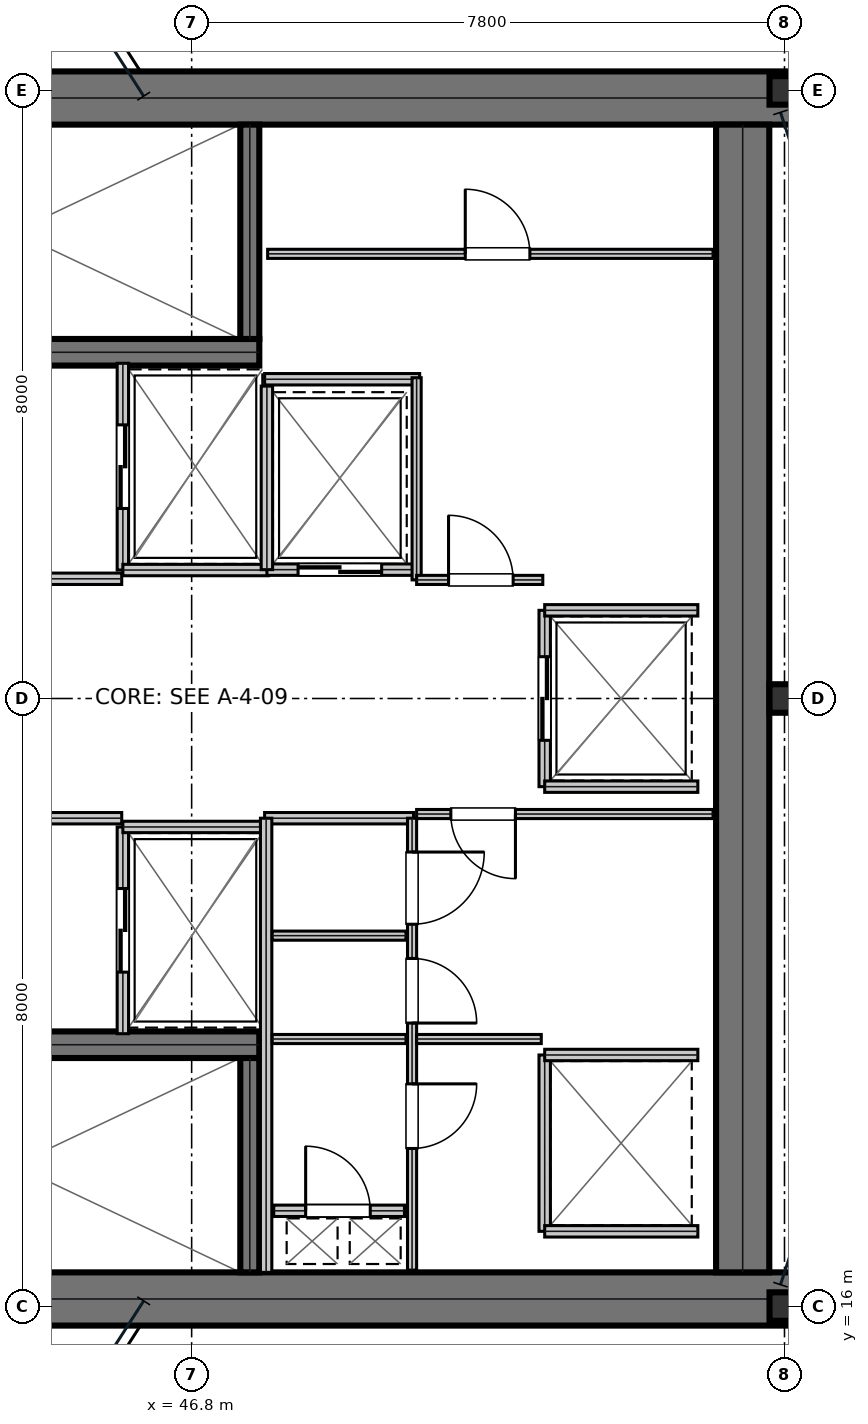
"""IFC4 building model, lengths in metres.
Left out: names, types, materials, properties, quantities, classifications, styles, units other than length and angle.
Written with IfcOpenShell. Run it as: python <this file> out.ifc"""

import sys

from ifc_helpers import new_model, si_unit, direction, frame, frame_2d, origin, origin_2d, place, context, subcontext, project, spatial, rectangle, i_section, extrude, element, fill, save


model = new_model("IFC4")
c1 = context("Model", 3, precision=1e-05, world=origin(), true_north=direction((0.0, 1.0)))
c2 = subcontext(c1, "Body", "Model", "MODEL_VIEW")
j1 = project(units=[si_unit("LENGTHUNIT", "METRE"), si_unit("PLANEANGLEUNIT", "RADIAN")], contexts=[c1])
p1 = place(None, origin())
s1 = spatial("IfcSite", under=j1, at=p1, CompositionType="ELEMENT")
p2 = place(p1, origin())
s2 = spatial("IfcBuilding", under=s1, at=p2, CompositionType="ELEMENT")
p3 = place(p2, frame((0.0, 0.0, 191.85)))
s3 = spatial("IfcBuildingStorey", under=s2, at=p3, CompositionType="ELEMENT", Elevation=191.85)
for number, where, z_axis, x_axis in (
    (1, (38.8, 31.9, 0.0), (0.0, 0.0, 1.0), (1.0, 0.0, 0.0)),
    (2, (38.8, 16.1, 0.0), (0.0, 0.0, 1.0), (1.0, 0.0, 0.0)),
):
    element("IfcWall", number, at=place(p3, frame(where, z_axis=z_axis, x_axis=x_axis)), inside=s3, PredefinedType="SHEAR", context=c2, shape_type="SweptSolid", body=[
        extrude(rectangle(XDim=16.0, YDim=0.7, at=frame_2d((8.0, 0.0))), origin(), (0.0, 0.0, 1.0), 3.79),
    ])
p4 = place(p3, frame((54.05, 16.45, 0.0), z_axis=(0.0, 0.0, 1.0), x_axis=(0.0, 1.0, 0.0)))
e3 = element("IfcWall", 3, at=p4, inside=s3, PredefinedType="SHEAR", context=c2, shape_type="SweptSolid", body=[
    extrude(rectangle(XDim=15.1, YDim=0.7, at=frame_2d((7.55, 0.0))), origin(), (0.0, 0.0, 1.0), 3.79),
])
p5 = place(p3, frame((39.98, 28.555, 0.0), z_axis=(0.0, 0.0, 1.0), x_axis=(1.0, 0.0, 0.0)))
e4 = element("IfcWall", 4, at=p5, inside=s3, PredefinedType="SHEAR", context=c2, shape_type="SweptSolid", body=[
    extrude(rectangle(XDim=7.71, YDim=0.35, at=frame_2d((3.855, 0.0))), origin(), (0.0, 0.0, 1.0), 3.79),
])
p6 = place(p5, frame((0.25, 0.0, 0.0)))
e5 = element("IfcOpeningElement", 5, at=p6, cuts=e4, PredefinedType="OPENING", context=c2, shape_type="SweptSolid", body=[
    extrude(rectangle(XDim=1.1, YDim=2.15, at=frame_2d((0.55, 1.075))), frame((0.0, 0.185, 0.0), z_axis=(0.0, -1.0, 0.0), x_axis=(1.0, 0.0, 0.0)), (0.0, 0.0, 1.0), 0.37),
])
p7 = place(p3, frame((39.98, 19.445, 0.0), z_axis=(0.0, 0.0, 1.0), x_axis=(1.0, 0.0, 0.0)))
e6 = element("IfcWall", 6, at=p7, inside=s3, PredefinedType="SHEAR", context=c2, shape_type="SweptSolid", body=[
    extrude(rectangle(XDim=7.71, YDim=0.35, at=frame_2d((3.855, 0.0))), origin(), (0.0, 0.0, 1.0), 3.79),
])
p8 = place(p7, frame((0.25, 0.0, 0.0)))
e7 = element("IfcOpeningElement", 7, at=p8, cuts=e6, PredefinedType="OPENING", context=c2, shape_type="SweptSolid", body=[
    extrude(rectangle(XDim=1.1, YDim=2.15, at=frame_2d((0.55, 1.075))), frame((0.0, 0.185, 0.0), z_axis=(0.0, -1.0, 0.0), x_axis=(1.0, 0.0, 0.0)), (0.0, 0.0, 1.0), 0.37),
])
for number, where, z_axis, x_axis in (
    (8, (47.565, 28.73, 0.0), (0.0, 0.0, 1.0), (0.0, 1.0, 0.0)),
    (9, (47.565, 16.45, 0.0), (0.0, 0.0, 1.0), (0.0, 1.0, 0.0)),
):
    element("IfcWall", number, at=place(p3, frame(where, z_axis=z_axis, x_axis=x_axis)), inside=s3, PredefinedType="SHEAR", context=c2, shape_type="SweptSolid", body=[
        extrude(rectangle(XDim=2.82, YDim=0.25, at=frame_2d((1.41, 0.0))), origin(), (0.0, 0.0, 1.0), 3.79),
    ])
for number, where, z_axis, x_axis in (
    (10, (54.6, 16.0, 0.0), (0.0, 0.0, 1.0), (1.0, 0.0, 0.0)),
    (11, (54.6, 24.0, 0.0), (0.0, 0.0, 1.0), (1.0, 0.0, 0.0)),
    (12, (54.6, 32.0, 0.0), (0.0, 0.0, 1.0), (1.0, 0.0, 0.0)),
):
    element("IfcColumn", number, at=place(p3, frame(where, z_axis=z_axis, x_axis=x_axis)), inside=s3, PredefinedType="COLUMN", context=c2, shape_type="SweptSolid", body=[
        extrude(i_section(OverallWidth=0.394, OverallDepth=0.375, WebThickness=0.017, FlangeThickness=0.028, at=origin_2d()), origin(), (0.0, 0.0, 1.0), 4.044),
    ])
p9 = place(p3, frame((39.98, 25.575, 0.0), z_axis=(0.0, 0.0, 1.0), x_axis=(1.0, 0.0, 0.0)))
e13 = element("IfcWall", 13, at=p9, inside=s3, PredefinedType="PARTITIONING", context=c2, shape_type="SweptSolid", body=[
    extrude(rectangle(XDim=5.9, YDim=0.15, at=frame_2d((2.95, 0.0))), origin(), (0.0, 0.0, 1.0), 3.79),
])
p10 = place(p9, frame((2.35, 0.0, 0.0)))
e14 = element("IfcOpeningElement", 14, at=p10, cuts=e13, PredefinedType="OPENING", context=c2, shape_type="SweptSolid", body=[
    extrude(rectangle(XDim=1.05, YDim=2.15, at=frame_2d((0.525, 1.075))), frame((0.0, 0.085, 0.0), z_axis=(0.0, -1.0, 0.0), x_axis=(1.0, 0.0, 0.0)), (0.0, 0.0, 1.0), 0.17),
])
p11 = place(p3, frame((39.98, 22.425, 0.0), z_axis=(0.0, 0.0, 1.0), x_axis=(1.0, 0.0, 0.0)))
e15 = element("IfcWall", 15, at=p11, inside=s3, PredefinedType="PARTITIONING", context=c2, shape_type="SweptSolid", body=[
    extrude(rectangle(XDim=5.9, YDim=0.15, at=frame_2d((2.95, 0.0))), origin(), (0.0, 0.0, 1.0), 3.79),
])
p12 = place(p11, frame((2.35, 0.0, 0.0)))
e16 = element("IfcOpeningElement", 16, at=p12, cuts=e15, PredefinedType="OPENING", context=c2, shape_type="SweptSolid", body=[
    extrude(rectangle(XDim=1.05, YDim=2.15, at=frame_2d((0.525, 1.075))), frame((0.0, 0.085, 0.0), z_axis=(0.0, -1.0, 0.0), x_axis=(1.0, 0.0, 0.0)), (0.0, 0.0, 1.0), 0.17),
])
p13 = place(p3, frame((45.895, 25.69, 0.0), z_axis=(0.0, 0.0, 1.0), x_axis=(0.0, 1.0, 0.0)))
e17 = element("IfcWall", 17, at=p13, inside=s3, PredefinedType="PARTITIONING", context=c2, shape_type="SweptSolid", body=[
    extrude(rectangle(XDim=2.72, YDim=0.15, at=frame_2d((1.36, 0.0))), origin(), (0.0, 0.0, 1.0), 3.79),
])
p14 = place(p13, frame((0.81, 0.0, 0.0)))
e18 = element("IfcOpeningElement", 18, at=p14, cuts=e17, PredefinedType="OPENING", context=c2, shape_type="SweptSolid", body=[
    extrude(rectangle(XDim=1.1, YDim=2.15, at=frame_2d((0.55, 1.075))), frame((0.0, 0.085, 0.0), z_axis=(0.0, -1.0, 0.0), x_axis=(1.0, 0.0, 0.0)), (0.0, 0.0, 1.0), 0.17),
])
p15 = place(p3, frame((45.895, 25.69, 0.0), z_axis=(0.0, 0.0, 1.0), x_axis=(1.0, 0.0, 0.0)))
e19 = element("IfcWall", 19, at=p15, inside=s3, PredefinedType="PARTITIONING", context=c2, shape_type="SweptSolid", body=[
    extrude(rectangle(XDim=1.915, YDim=0.15, at=frame_2d((0.958, 0.0))), origin(), (0.0, 0.0, 1.0), 3.79),
])
p16 = place(p3, frame((45.895, 19.59, 0.0), z_axis=(0.0, 0.0, 1.0), x_axis=(0.0, 1.0, 0.0)))
e20 = element("IfcWall", 20, at=p16, inside=s3, PredefinedType="PARTITIONING", context=c2, shape_type="SweptSolid", body=[
    extrude(rectangle(XDim=2.72, YDim=0.15, at=frame_2d((1.36, 0.0))), origin(), (0.0, 0.0, 1.0), 3.79),
])
p17 = place(p16, frame((0.81, 0.0, 0.0)))
e21 = element("IfcOpeningElement", 21, at=p17, cuts=e20, PredefinedType="OPENING", context=c2, shape_type="SweptSolid", body=[
    extrude(rectangle(XDim=1.1, YDim=2.15, at=frame_2d((0.55, 1.075))), frame((0.0, 0.085, 0.0), z_axis=(0.0, -1.0, 0.0), x_axis=(1.0, 0.0, 0.0)), (0.0, 0.0, 1.0), 0.17),
])
p18 = place(p3, frame((45.895, 22.31, 0.0), z_axis=(0.0, 0.0, 1.0), x_axis=(1.0, 0.0, 0.0)))
e22 = element("IfcWall", 22, at=p18, inside=s3, PredefinedType="PARTITIONING", context=c2, shape_type="SweptSolid", body=[
    extrude(rectangle(XDim=1.915, YDim=0.15, at=frame_2d((0.958, 0.0))), origin(), (0.0, 0.0, 1.0), 3.79),
])
p19 = place(p3, frame((47.79, 25.695, 0.0), z_axis=(0.0, 0.0, 1.0), x_axis=(1.0, 0.0, 0.0)))
e23 = element("IfcWall", 23, at=p19, inside=s3, PredefinedType="PARTITIONING", context=c2, shape_type="SweptSolid", body=[
    extrude(rectangle(XDim=1.92, YDim=0.15, at=frame_2d((0.96, 0.0))), origin(), (0.0, 0.0, 1.0), 3.79),
])
p20 = place(p19, frame((0.41, 0.0, 0.0)))
e24 = element("IfcOpeningElement", 24, at=p20, cuts=e23, PredefinedType="OPENING", context=c2, shape_type="SweptSolid", body=[
    extrude(rectangle(XDim=1.1, YDim=2.15, at=frame_2d((0.55, 1.075))), frame((0.0, 0.085, 0.0), z_axis=(0.0, -1.0, 0.0), x_axis=(1.0, 0.0, 0.0)), (0.0, 0.0, 1.0), 0.17),
])
p21 = place(p3, frame((47.79, 25.695, 0.0), z_axis=(0.0, 0.0, 1.0), x_axis=(0.0, 1.0, 0.0)))
e25 = element("IfcWall", 25, at=p21, inside=s3, PredefinedType="PARTITIONING", context=c2, shape_type="SweptSolid", body=[
    extrude(rectangle(XDim=2.415, YDim=0.15, at=frame_2d((1.208, 0.0))), origin(), (0.0, 0.0, 1.0), 3.79),
])
p22 = place(p3, frame((51.445, 22.84, 0.0), z_axis=(0.0, 0.0, 1.0), x_axis=(0.0, 1.0, 0.0)))
e26 = element("IfcWall", 26, at=p22, inside=s3, PredefinedType="PARTITIONING", context=c2, shape_type="SweptSolid", body=[
    extrude(rectangle(XDim=2.32, YDim=0.15, at=frame_2d((1.16, 0.0))), origin(), (0.0, 0.0, 1.0), 3.79),
])
p23 = place(p22, frame((0.61, 0.0, 0.0)))
e27 = element("IfcOpeningElement", 27, at=p23, cuts=e26, PredefinedType="OPENING", context=c2, shape_type="SweptSolid", body=[
    extrude(rectangle(XDim=1.1, YDim=2.15, at=frame_2d((0.55, 1.075))), frame((0.0, 0.085, 0.0), z_axis=(0.0, -1.0, 0.0), x_axis=(1.0, 0.0, 0.0)), (0.0, 0.0, 1.0), 0.17),
])
for number, where, z_axis, x_axis in (
    (28, (51.445, 22.84, 0.0), (0.0, 0.0, 1.0), (1.0, 0.0, 0.0)),
    (29, (51.445, 25.16, 0.0), (0.0, 0.0, 1.0), (1.0, 0.0, 0.0)),
):
    element("IfcWall", number, at=place(p3, frame(where, z_axis=z_axis, x_axis=x_axis)), inside=s3, PredefinedType="PARTITIONING", context=c2, shape_type="SweptSolid", body=[
        extrude(rectangle(XDim=2.015, YDim=0.15, at=frame_2d((1.007, 0.0))), origin(), (0.0, 0.0, 1.0), 3.79),
    ])
p24 = place(p3, frame((51.445, 16.99, 0.0), z_axis=(0.0, 0.0, 1.0), x_axis=(0.0, 1.0, 0.0)))
e30 = element("IfcWall", 30, at=p24, inside=s3, PredefinedType="PARTITIONING", context=c2, shape_type="SweptSolid", body=[
    extrude(rectangle(XDim=2.32, YDim=0.15, at=frame_2d((1.16, 0.0))), origin(), (0.0, 0.0, 1.0), 3.79),
])
for number, where, z_axis, x_axis in (
    (31, (51.445, 16.99, 0.0), (0.0, 0.0, 1.0), (1.0, 0.0, 0.0)),
    (32, (51.445, 19.31, 0.0), (0.0, 0.0, 1.0), (1.0, 0.0, 0.0)),
):
    element("IfcWall", number, at=place(p3, frame(where, z_axis=z_axis, x_axis=x_axis)), inside=s3, PredefinedType="PARTITIONING", context=c2, shape_type="SweptSolid", body=[
        extrude(rectangle(XDim=2.015, YDim=0.15, at=frame_2d((1.007, 0.0))), origin(), (0.0, 0.0, 1.0), 3.79),
    ])
p25 = place(p3, frame((47.88, 17.26, 0.0), z_axis=(0.0, 0.0, 1.0), x_axis=(1.0, 0.0, 0.0)))
e33 = element("IfcWall", 33, at=p25, inside=s3, PredefinedType="PARTITIONING", context=c2, shape_type="SweptSolid", body=[
    extrude(rectangle(XDim=1.72, YDim=0.15, at=frame_2d((0.86, 0.0))), origin(), (0.0, 0.0, 1.0), 3.79),
])
p26 = place(p25, frame((0.42, 0.0, 0.0)))
e34 = element("IfcOpeningElement", 34, at=p26, cuts=e33, PredefinedType="OPENING", context=c2, shape_type="SweptSolid", body=[
    extrude(rectangle(XDim=0.85, YDim=2.15, at=frame_2d((0.425, 1.075))), frame((0.0, 0.085, 0.0), z_axis=(0.0, -1.0, 0.0), x_axis=(1.0, 0.0, 0.0)), (0.0, 0.0, 1.0), 0.17),
])
p27 = place(p3, frame((47.76, 22.425, 0.0), z_axis=(0.0, 0.0, 1.0), x_axis=(1.0, 0.0, 0.0)))
e35 = element("IfcWall", 35, at=p27, inside=s3, PredefinedType="PARTITIONING", context=c2, shape_type="SweptSolid", body=[
    extrude(rectangle(XDim=1.96, YDim=0.15, at=frame_2d((0.98, 0.0))), origin(), (0.0, 0.0, 1.0), 3.79),
])
p28 = place(p3, frame((47.78, 16.45, 0.0), z_axis=(0.0, 0.0, 1.0), x_axis=(0.0, 1.0, 0.0)))
e36 = element("IfcWall", 36, at=p28, inside=s3, PredefinedType="PARTITIONING", context=c2, shape_type="SweptSolid", body=[
    extrude(rectangle(XDim=5.975, YDim=0.15, at=frame_2d((2.988, 0.0))), origin(), (0.0, 0.0, 1.0), 3.79),
])
for number, where, z_axis, x_axis in (
    (37, (47.86, 19.52, 0.0), (0.0, 0.0, 1.0), (1.0, 0.0, 0.0)),
    (38, (47.86, 20.88, 0.0), (0.0, 0.0, 1.0), (1.0, 0.0, 0.0)),
):
    element("IfcWall", number, at=place(p3, frame(where, z_axis=z_axis, x_axis=x_axis)), inside=s3, PredefinedType="PARTITIONING", context=c2, shape_type="SweptSolid", body=[
        extrude(rectangle(XDim=1.76, YDim=0.12, at=frame_2d((0.88, 0.0))), origin(), (0.0, 0.0, 1.0), 3.79),
    ])
p29 = place(p3, frame((49.7, 16.48, 0.0), z_axis=(0.0, 0.0, 1.0), x_axis=(0.0, 1.0, 0.0)))
e39 = element("IfcWall", 39, at=p29, inside=s3, PredefinedType="PARTITIONING", context=c2, shape_type="SweptSolid", body=[
    extrude(rectangle(XDim=5.945, YDim=0.12, at=frame_2d((2.973, 0.0))), origin(), (0.0, 0.0, 1.0), 3.79),
])
p30 = place(p29, frame((1.6, 0.0, 0.0)))
e40 = element("IfcOpeningElement", 40, at=p30, cuts=e39, PredefinedType="OPENING", context=c2, shape_type="SweptSolid", body=[
    extrude(rectangle(XDim=0.85, YDim=2.15, at=frame_2d((0.425, 1.075))), frame((0.0, 0.07, 0.0), z_axis=(0.0, -1.0, 0.0), x_axis=(1.0, 0.0, 0.0)), (0.0, 0.0, 1.0), 0.14),
])
p31 = place(p29, frame((3.25, 0.0, 0.0)))
e41 = element("IfcOpeningElement", 41, at=p31, cuts=e39, PredefinedType="OPENING", context=c2, shape_type="SweptSolid", body=[
    extrude(rectangle(XDim=0.85, YDim=2.15, at=frame_2d((0.425, 1.075))), frame((0.0, 0.07, 0.0), z_axis=(0.0, -1.0, 0.0), x_axis=(1.0, 0.0, 0.0)), (0.0, 0.0, 1.0), 0.14),
])
p32 = place(p29, frame((4.55, 0.0, 0.0)))
e42 = element("IfcOpeningElement", 42, at=p32, cuts=e39, PredefinedType="OPENING", context=c2, shape_type="SweptSolid", body=[
    extrude(rectangle(XDim=0.95, YDim=2.15, at=frame_2d((0.475, 1.075))), frame((0.0, 0.07, 0.0), z_axis=(0.0, -1.0, 0.0), x_axis=(1.0, 0.0, 0.0)), (0.0, 0.0, 1.0), 0.14),
])
p33 = place(p3, frame((49.76, 22.48, 0.0), z_axis=(0.0, 0.0, 1.0), x_axis=(1.0, 0.0, 0.0)))
e43 = element("IfcWall", 43, at=p33, inside=s3, PredefinedType="PARTITIONING", context=c2, shape_type="SweptSolid", body=[
    extrude(rectangle(XDim=3.9, YDim=0.12, at=frame_2d((1.95, 0.0))), origin(), (0.0, 0.0, 1.0), 3.79),
])
p34 = place(p33, frame((0.45, 0.0, 0.0)))
e44 = element("IfcOpeningElement", 44, at=p34, cuts=e43, PredefinedType="OPENING", context=c2, shape_type="SweptSolid", body=[
    extrude(rectangle(XDim=0.85, YDim=2.15, at=frame_2d((0.425, 1.075))), frame((0.0, 0.07, 0.0), z_axis=(0.0, -1.0, 0.0), x_axis=(1.0, 0.0, 0.0)), (0.0, 0.0, 1.0), 0.14),
])
p35 = place(p3, frame((49.76, 19.52, 0.0), z_axis=(0.0, 0.0, 1.0), x_axis=(1.0, 0.0, 0.0)))
e45 = element("IfcWall", 45, at=p35, inside=s3, PredefinedType="PARTITIONING", context=c2, shape_type="SweptSolid", body=[
    extrude(rectangle(XDim=1.64, YDim=0.12, at=frame_2d((0.82, 0.0))), origin(), (0.0, 0.0, 1.0), 3.79),
])
p36 = place(p3, frame((47.76, 28.2, 0.0), z_axis=(0.0, 0.0, 1.0), x_axis=(1.0, 0.0, 0.0)))
e46 = element("IfcWall", 46, at=p36, inside=s3, PredefinedType="PARTITIONING", context=c2, shape_type="SweptSolid", body=[
    extrude(rectangle(XDim=2.04, YDim=0.15, at=frame_2d((1.02, 0.0))), origin(), (0.0, 0.0, 1.0), 3.79),
])
p37 = place(p3, frame((49.76, 25.56, 0.0), z_axis=(0.0, 0.0, 1.0), x_axis=(0.0, 1.0, 0.0)))
e47 = element("IfcWall", 47, at=p37, inside=s3, PredefinedType="PARTITIONING", context=c2, shape_type="SweptSolid", body=[
    extrude(rectangle(XDim=2.66, YDim=0.12, at=frame_2d((1.33, 0.0))), origin(), (0.0, 0.0, 1.0), 3.79),
])
p38 = place(p3, frame((49.76, 25.56, 0.0), z_axis=(0.0, 0.0, 1.0), x_axis=(1.0, 0.0, 0.0)))
e48 = element("IfcWall", 48, at=p38, inside=s3, PredefinedType="PARTITIONING", context=c2, shape_type="SweptSolid", body=[
    extrude(rectangle(XDim=1.66, YDim=0.12, at=frame_2d((0.83, 0.0))), origin(), (0.0, 0.0, 1.0), 3.79),
])
p39 = place(p38, frame((0.42, 0.0, 0.0)))
e49 = element("IfcOpeningElement", 49, at=p39, cuts=e48, PredefinedType="OPENING", context=c2, shape_type="SweptSolid", body=[
    extrude(rectangle(XDim=0.85, YDim=2.15, at=frame_2d((0.425, 1.075))), frame((0.0, 0.07, 0.0), z_axis=(0.0, -1.0, 0.0), x_axis=(1.0, 0.0, 0.0)), (0.0, 0.0, 1.0), 0.14),
])
p40 = place(p3, frame((47.8, 29.85, 0.0), z_axis=(0.0, 0.0, 1.0), x_axis=(1.0, 0.0, 0.0)))
e50 = element("IfcWall", 50, at=p40, inside=s3, PredefinedType="PARTITIONING", context=c2, shape_type="SweptSolid", body=[
    extrude(rectangle(XDim=5.86, YDim=0.12, at=frame_2d((2.93, 0.0))), origin(), (0.0, 0.0, 1.0), 3.79),
])
p41 = place(p40, frame((2.6, 0.0, 0.0)))
e51 = element("IfcOpeningElement", 51, at=p41, cuts=e50, PredefinedType="OPENING", context=c2, shape_type="SweptSolid", body=[
    extrude(rectangle(XDim=0.85, YDim=2.15, at=frame_2d((0.425, 1.075))), frame((0.0, 0.07, 0.0), z_axis=(0.0, -1.0, 0.0), x_axis=(1.0, 0.0, 0.0)), (0.0, 0.0, 1.0), 0.14),
])
p42 = place(p14, frame((1.1, 0.0, 0.0), z_axis=(0.0, 0.0, 1.0), x_axis=(-1.0, 0.0, 0.0)))
e52 = element("IfcDoor", 52, at=p42, inside=s3, OperationType="DOUBLE_DOOR_SLIDING", PredefinedType="DOOR", context=c2, shape_type="SweptSolid", body=[
    extrude(rectangle(XDim=1.1, YDim=2.15, at=frame_2d((0.55, 1.075))), frame((0.0, 0.025, 0.0), z_axis=(0.0, -1.0, 0.0), x_axis=(1.0, 0.0, 0.0)), (0.0, 0.0, 1.0), 0.05),
])
fill(e18, e52)
p43 = place(p17, frame((1.1, 0.0, 0.0), z_axis=(0.0, 0.0, 1.0), x_axis=(-1.0, 0.0, 0.0)))
e53 = element("IfcDoor", 53, at=p43, inside=s3, OperationType="DOUBLE_DOOR_SLIDING", PredefinedType="DOOR", context=c2, shape_type="SweptSolid", body=[
    extrude(rectangle(XDim=1.1, YDim=2.15, at=frame_2d((0.55, 1.075))), frame((0.0, 0.025, 0.0), z_axis=(0.0, -1.0, 0.0), x_axis=(1.0, 0.0, 0.0)), (0.0, 0.0, 1.0), 0.05),
])
fill(e21, e53)
p44 = place(p20, frame((1.1, 0.0, 0.0), z_axis=(0.0, 0.0, 1.0), x_axis=(-1.0, 0.0, 0.0)))
e54 = element("IfcDoor", 54, at=p44, inside=s3, OperationType="DOUBLE_DOOR_SLIDING", PredefinedType="DOOR", context=c2, shape_type="SweptSolid", body=[
    extrude(rectangle(XDim=1.1, YDim=2.15, at=frame_2d((0.55, 1.075))), frame((0.0, 0.025, 0.0), z_axis=(0.0, -1.0, 0.0), x_axis=(1.0, 0.0, 0.0)), (0.0, 0.0, 1.0), 0.05),
])
fill(e24, e54)
p45 = place(p23, frame((1.1, 0.0, 0.0), z_axis=(0.0, 0.0, 1.0), x_axis=(-1.0, 0.0, 0.0)))
e55 = element("IfcDoor", 55, at=p45, inside=s3, OperationType="DOUBLE_DOOR_SLIDING", PredefinedType="DOOR", context=c2, shape_type="SweptSolid", body=[
    extrude(rectangle(XDim=1.1, YDim=2.15, at=frame_2d((0.55, 1.075))), frame((0.0, 0.025, 0.0), z_axis=(0.0, -1.0, 0.0), x_axis=(1.0, 0.0, 0.0)), (0.0, 0.0, 1.0), 0.05),
])
fill(e27, e55)
p46 = place(p26, origin())
e56 = element("IfcDoor", 56, at=p46, inside=s3, OperationType="SINGLE_SWING_LEFT", PredefinedType="TRAPDOOR", context=c2, shape_type="SweptSolid", body=[
    extrude(rectangle(XDim=0.85, YDim=2.15, at=frame_2d((0.425, 1.075))), frame((0.0, 0.025, 0.0), z_axis=(0.0, -1.0, 0.0), x_axis=(1.0, 0.0, 0.0)), (0.0, 0.0, 1.0), 0.05),
])
fill(e34, e56)
p47 = place(p30, frame((0.85, 0.0, 0.0), z_axis=(0.0, 0.0, 1.0), x_axis=(-1.0, 0.0, 0.0)))
e57 = element("IfcDoor", 57, at=p47, inside=s3, OperationType="SINGLE_SWING_LEFT", PredefinedType="DOOR", context=c2, shape_type="SweptSolid", body=[
    extrude(rectangle(XDim=0.85, YDim=2.15, at=frame_2d((0.425, 1.075))), frame((0.0, 0.025, 0.0), z_axis=(0.0, -1.0, 0.0), x_axis=(1.0, 0.0, 0.0)), (0.0, 0.0, 1.0), 0.05),
])
fill(e40, e57)
p48 = place(p31, frame((0.85, 0.0, 0.0), z_axis=(0.0, 0.0, 1.0), x_axis=(-1.0, 0.0, 0.0)))
e58 = element("IfcDoor", 58, at=p48, inside=s3, OperationType="SINGLE_SWING_RIGHT", PredefinedType="DOOR", context=c2, shape_type="SweptSolid", body=[
    extrude(rectangle(XDim=0.85, YDim=2.15, at=frame_2d((0.425, 1.075))), frame((0.0, 0.025, 0.0), z_axis=(0.0, -1.0, 0.0), x_axis=(1.0, 0.0, 0.0)), (0.0, 0.0, 1.0), 0.05),
])
fill(e41, e58)
p49 = place(p32, frame((0.95, 0.0, 0.0), z_axis=(0.0, 0.0, 1.0), x_axis=(-1.0, 0.0, 0.0)))
e59 = element("IfcDoor", 59, at=p49, inside=s3, OperationType="SINGLE_SWING_LEFT", PredefinedType="DOOR", context=c2, shape_type="SweptSolid", body=[
    extrude(rectangle(XDim=0.95, YDim=2.15, at=frame_2d((0.475, 1.075))), frame((0.0, 0.025, 0.0), z_axis=(0.0, -1.0, 0.0), x_axis=(1.0, 0.0, 0.0)), (0.0, 0.0, 1.0), 0.05),
])
fill(e42, e59)
p50 = place(p34, frame((0.85, 0.0, 0.0), z_axis=(0.0, 0.0, 1.0), x_axis=(-1.0, 0.0, 0.0)))
e60 = element("IfcDoor", 60, at=p50, inside=s3, OperationType="SINGLE_SWING_LEFT", PredefinedType="DOOR", context=c2, shape_type="SweptSolid", body=[
    extrude(rectangle(XDim=0.85, YDim=2.15, at=frame_2d((0.425, 1.075))), frame((0.0, 0.025, 0.0), z_axis=(0.0, -1.0, 0.0), x_axis=(1.0, 0.0, 0.0)), (0.0, 0.0, 1.0), 0.05),
])
fill(e44, e60)
p51 = place(p39, origin())
e61 = element("IfcDoor", 61, at=p51, inside=s3, OperationType="SINGLE_SWING_LEFT", PredefinedType="DOOR", context=c2, shape_type="SweptSolid", body=[
    extrude(rectangle(XDim=0.85, YDim=2.15, at=frame_2d((0.425, 1.075))), frame((0.0, 0.025, 0.0), z_axis=(0.0, -1.0, 0.0), x_axis=(1.0, 0.0, 0.0)), (0.0, 0.0, 1.0), 0.05),
])
fill(e49, e61)
p52 = place(p41, origin())
e62 = element("IfcDoor", 62, at=p52, inside=s3, OperationType="SINGLE_SWING_LEFT", PredefinedType="DOOR", context=c2, shape_type="SweptSolid", body=[
    extrude(rectangle(XDim=0.85, YDim=2.15, at=frame_2d((0.425, 1.075))), frame((0.0, 0.025, 0.0), z_axis=(0.0, -1.0, 0.0), x_axis=(1.0, 0.0, 0.0)), (0.0, 0.0, 1.0), 0.05),
])
fill(e51, e62)
save(model, sys.argv[1])
